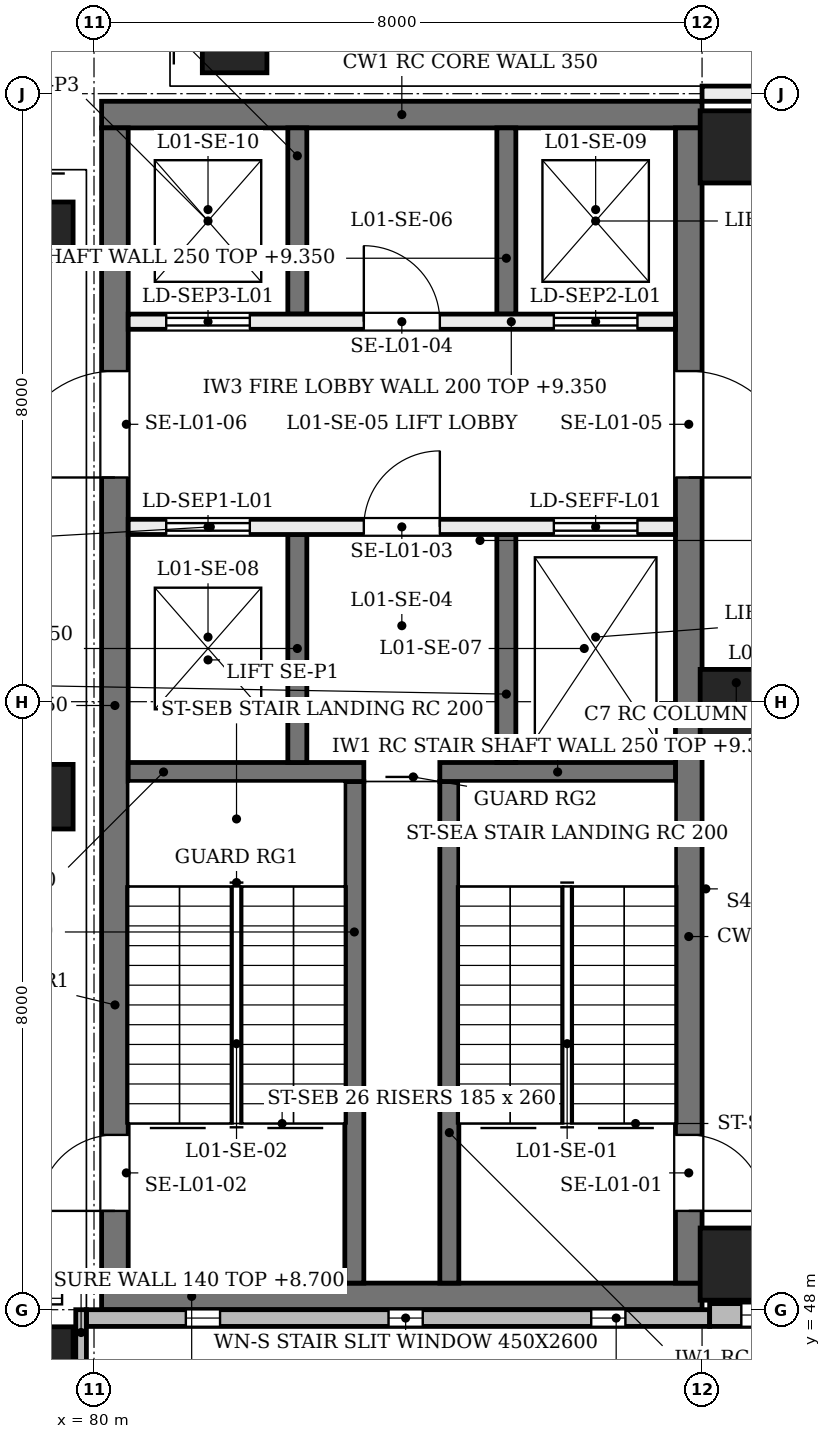
"""IFC4 building model, lengths in metres.
Left out: names, types, materials, properties, quantities, classifications, styles, units other than length and angle.
Written with IfcOpenShell. Run it as: python <this file> out.ifc"""

import sys

from ifc_helpers import new_model, si_unit, direction, frame, frame_2d, origin, origin_2d, place, context, subcontext, project, spatial, rectangle, extrude, element, fill, save


model = new_model("IFC4")
c1 = context("Model", 3, precision=1e-05, world=origin(), true_north=direction((0.0, 1.0)))
c2 = subcontext(c1, "Body", "Model", "MODEL_VIEW")
j1 = project(units=[si_unit("LENGTHUNIT", "METRE"), si_unit("PLANEANGLEUNIT", "RADIAN")], contexts=[c1])
p1 = place(None, origin())
s1 = spatial("IfcSite", under=j1, at=p1, CompositionType="ELEMENT")
p2 = place(p1, origin())
s2 = spatial("IfcBuilding", under=s1, at=p2, CompositionType="ELEMENT")
p3 = place(p2, frame((0.0, 0.0, 4.8)))
s3 = spatial("IfcBuildingStorey", under=s2, at=p3, CompositionType="ELEMENT", Elevation=4.8)
for number, where, z_axis, x_axis in (
    (1, (80.1, 48.175, 0.0), (0.0, 0.0, 1.0), (1.0, 0.0, 0.0)),
    (2, (80.1, 63.725, 0.0), (0.0, 0.0, 1.0), (1.0, 0.0, 0.0)),
):
    element("IfcWall", number, at=place(p3, frame(where, z_axis=z_axis, x_axis=x_axis)), inside=s3, PredefinedType="SHEAR", context=c2, shape_type="SweptSolid", body=[
        extrude(rectangle(XDim=7.9, YDim=0.35, at=frame_2d((3.95, 0.0))), origin(), (0.0, 0.0, 1.0), 4.58),
    ])
p4 = place(p3, frame((80.275, 48.35, 0.0), z_axis=(0.0, 0.0, 1.0), x_axis=(0.0, 1.0, 0.0)))
e3 = element("IfcWall", 3, at=p4, inside=s3, PredefinedType="SHEAR", context=c2, shape_type="SweptSolid", body=[
    extrude(rectangle(XDim=15.2, YDim=0.35, at=frame_2d((7.6, 0.0))), origin(), (0.0, 0.0, 1.0), 4.58),
])
p5 = place(p4, frame((0.95, 0.0, 0.0)))
e4 = element("IfcOpeningElement", 4, at=p5, cuts=e3, PredefinedType="OPENING", context=c2, shape_type="SweptSolid", body=[
    extrude(rectangle(XDim=1.0, YDim=2.1, at=frame_2d((0.5, 1.05))), frame((0.0, 0.185, 0.0), z_axis=(0.0, -1.0, 0.0), x_axis=(1.0, 0.0, 0.0)), (0.0, 0.0, 1.0), 0.37),
])
p6 = place(p4, frame((10.6, 0.0, 0.0)))
e5 = element("IfcOpeningElement", 5, at=p6, cuts=e3, PredefinedType="OPENING", context=c2, shape_type="SweptSolid", body=[
    extrude(rectangle(XDim=1.4, YDim=2.1, at=frame_2d((0.7, 1.05))), frame((0.0, 0.185, 0.0), z_axis=(0.0, -1.0, 0.0), x_axis=(1.0, 0.0, 0.0)), (0.0, 0.0, 1.0), 0.37),
])
p7 = place(p3, frame((87.825, 48.35, 0.0), z_axis=(0.0, 0.0, 1.0), x_axis=(0.0, 1.0, 0.0)))
e6 = element("IfcWall", 6, at=p7, inside=s3, PredefinedType="SHEAR", context=c2, shape_type="SweptSolid", body=[
    extrude(rectangle(XDim=15.2, YDim=0.35, at=frame_2d((7.6, 0.0))), origin(), (0.0, 0.0, 1.0), 4.58),
])
p8 = place(p7, frame((0.95, 0.0, 0.0)))
e7 = element("IfcOpeningElement", 7, at=p8, cuts=e6, PredefinedType="OPENING", context=c2, shape_type="SweptSolid", body=[
    extrude(rectangle(XDim=1.0, YDim=2.1, at=frame_2d((0.5, 1.05))), frame((0.0, 0.185, 0.0), z_axis=(0.0, -1.0, 0.0), x_axis=(1.0, 0.0, 0.0)), (0.0, 0.0, 1.0), 0.37),
])
p9 = place(p7, frame((10.6, 0.0, 0.0)))
e8 = element("IfcOpeningElement", 8, at=p9, cuts=e6, PredefinedType="OPENING", context=c2, shape_type="SweptSolid", body=[
    extrude(rectangle(XDim=1.4, YDim=2.1, at=frame_2d((0.7, 1.05))), frame((0.0, 0.185, 0.0), z_axis=(0.0, -1.0, 0.0), x_axis=(1.0, 0.0, 0.0)), (0.0, 0.0, 1.0), 0.37),
])
for number, where, z_axis, x_axis in (
    (9, (88.45, 48.6, 0.0), (0.0, 0.0, 1.0), (1.0, 0.0, 0.0)),
    (10, (88.45, 55.95, 0.0), (0.0, 0.0, 1.0), (1.0, 0.0, 0.0)),
    (11, (88.45, 63.3, 0.0), (0.0, 0.0, 1.0), (1.0, 0.0, 0.0)),
):
    element("IfcColumn", number, at=place(p3, frame(where, z_axis=z_axis, x_axis=x_axis)), inside=s3, PredefinedType="COLUMN", context=c2, shape_type="SweptSolid", body=[
        extrude(rectangle(XDim=0.95, YDim=0.95, at=origin_2d()), origin(), (0.0, 0.0, 1.0), 4.8),
    ])
for number, where, z_axis, x_axis in (
    (12, (79.3, 47.6, 0.0), (0.0, -0.204, 0.979), (1.0, 0.0, 0.0)),
    (13, (79.3, 55.0, 0.0), (0.0, -0.204, 0.979), (1.0, 0.0, 0.0)),
    (14, (79.3, 62.4, 0.0), (0.0, -0.204, 0.979), (1.0, 0.0, 0.0)),
    (15, (81.6, 64.7, 0.0), (0.204, 0.0, 0.979), (0.0, 1.0, 0.0)),
    (16, (89.0, 64.7, 0.0), (0.204, 0.0, 0.979), (0.0, 1.0, 0.0)),
):
    element("IfcColumn", number, at=place(p3, frame(where, z_axis=z_axis, x_axis=x_axis)), inside=s3, PredefinedType="COLUMN", context=c2, shape_type="SweptSolid", body=[
        extrude(rectangle(XDim=0.85, YDim=0.85, at=origin_2d()), origin(), (0.0, 0.0, 1.0), 4.903),
    ])
p10 = place(p3, frame((79.9, 47.89, 0.0), z_axis=(0.0, 0.0, 1.0), x_axis=(1.0, 0.0, 0.0)))
e17 = element("IfcWall", 17, at=p10, inside=s3, PredefinedType="SOLIDWALL", context=c2, shape_type="SweptSolid", body=[
    extrude(rectangle(XDim=8.2, YDim=0.22, at=frame_2d((4.1, 0.0))), origin(), (0.0, 0.0, 1.0), 3.9),
])
p11 = place(p10, frame((1.308, 0.0, 0.9)))
e18 = element("IfcOpeningElement", 18, at=p11, cuts=e17, PredefinedType="OPENING", context=c2, shape_type="SweptSolid", body=[
    extrude(rectangle(XDim=0.45, YDim=2.6, at=frame_2d((0.225, 1.3))), frame((0.0, 0.12, 0.0), z_axis=(0.0, -1.0, 0.0), x_axis=(1.0, 0.0, 0.0)), (0.0, 0.0, 1.0), 0.24),
])
p12 = place(p10, frame((3.975, 0.0, 0.9)))
e19 = element("IfcOpeningElement", 19, at=p12, cuts=e17, PredefinedType="OPENING", context=c2, shape_type="SweptSolid", body=[
    extrude(rectangle(XDim=0.45, YDim=2.6, at=frame_2d((0.225, 1.3))), frame((0.0, 0.12, 0.0), z_axis=(0.0, -1.0, 0.0), x_axis=(1.0, 0.0, 0.0)), (0.0, 0.0, 1.0), 0.24),
])
p13 = place(p10, frame((6.642, 0.0, 0.9)))
e20 = element("IfcOpeningElement", 20, at=p13, cuts=e17, PredefinedType="OPENING", context=c2, shape_type="SweptSolid", body=[
    extrude(rectangle(XDim=0.45, YDim=2.6, at=frame_2d((0.225, 1.3))), frame((0.0, 0.12, 0.0), z_axis=(0.0, -1.0, 0.0), x_axis=(1.0, 0.0, 0.0)), (0.0, 0.0, 1.0), 0.24),
])
p14 = place(p3, frame((88.1, 47.93, 0.0), z_axis=(0.0, 0.0, 1.0), x_axis=(1.0, 0.0, 0.0)))
e21 = element("IfcWall", 21, at=p14, inside=s3, PredefinedType="SOLIDWALL", context=c2, shape_type="SweptSolid", body=[
    extrude(rectangle(XDim=7.9, YDim=0.3, at=frame_2d((3.95, 0.0))), origin(), (0.0, 0.0, 1.0), 3.9),
])
p15 = place(p14, frame((0.417, 0.0, 0.75)))
e22 = element("IfcOpeningElement", 22, at=p15, cuts=e21, PredefinedType="OPENING", context=c2, shape_type="SweptSolid", body=[
    extrude(rectangle(XDim=1.8, YDim=3.1, at=frame_2d((0.9, 1.55))), frame((0.0, 0.16, 0.0), z_axis=(0.0, -1.0, 0.0), x_axis=(1.0, 0.0, 0.0)), (0.0, 0.0, 1.0), 0.32),
])
p16 = place(p14, frame((3.05, 0.0, 0.75)))
e23 = element("IfcOpeningElement", 23, at=p16, cuts=e21, PredefinedType="OPENING", context=c2, shape_type="SweptSolid", body=[
    extrude(rectangle(XDim=1.8, YDim=3.1, at=frame_2d((0.9, 1.55))), frame((0.0, 0.16, 0.0), z_axis=(0.0, -1.0, 0.0), x_axis=(1.0, 0.0, 0.0)), (0.0, 0.0, 1.0), 0.32),
])
p17 = place(p14, frame((5.683, 0.0, 0.75)))
e24 = element("IfcOpeningElement", 24, at=p17, cuts=e21, PredefinedType="OPENING", context=c2, shape_type="SweptSolid", body=[
    extrude(rectangle(XDim=1.8, YDim=3.1, at=frame_2d((0.9, 1.55))), frame((0.0, 0.16, 0.0), z_axis=(0.0, -1.0, 0.0), x_axis=(1.0, 0.0, 0.0)), (0.0, 0.0, 1.0), 0.32),
])
p18 = place(p3, frame((79.83, 47.0, 0.0), z_axis=(0.0, 0.0, 1.0), x_axis=(0.0, 1.0, 0.0)))
e25 = element("IfcWall", 25, at=p18, inside=s3, PredefinedType="SOLIDWALL", context=c2, shape_type="SweptSolid", body=[
    extrude(rectangle(XDim=1.0, YDim=0.14, at=frame_2d((0.5, 0.0))), origin(), (0.0, 0.0, 1.0), 3.9),
])
for number, where, z_axis, x_axis in (
    (26, (84.675, 48.35, 0.0), (0.0, 0.0, 1.0), (0.0, 1.0, 0.0)),
    (27, (83.425, 48.35, 0.0), (0.0, 0.0, 1.0), (0.0, 1.0, 0.0)),
):
    element("IfcWall", number, at=place(p3, frame(where, z_axis=z_axis, x_axis=x_axis)), inside=s3, PredefinedType="SOLIDWALL", context=c2, shape_type="SweptSolid", body=[
        extrude(rectangle(XDim=6.6, YDim=0.25, at=frame_2d((3.3, 0.0))), origin(), (0.0, 0.0, 1.0), 4.55),
    ])
p19 = place(p3, frame((87.65, 55.075, 0.0), z_axis=(0.0, 0.0, 1.0), x_axis=(-1.0, 0.0, 0.0)))
e28 = element("IfcWall", 28, at=p19, inside=s3, PredefinedType="SOLIDWALL", context=c2, shape_type="SweptSolid", body=[
    extrude(rectangle(XDim=3.1, YDim=0.25, at=frame_2d((1.55, 0.0))), origin(), (0.0, 0.0, 1.0), 4.55),
])
p20 = place(p3, frame((83.55, 55.075, 0.0), z_axis=(0.0, 0.0, 1.0), x_axis=(-1.0, 0.0, 0.0)))
e29 = element("IfcWall", 29, at=p20, inside=s3, PredefinedType="SOLIDWALL", context=c2, shape_type="SweptSolid", body=[
    extrude(rectangle(XDim=3.1, YDim=0.25, at=frame_2d((1.55, 0.0))), origin(), (0.0, 0.0, 1.0), 4.55),
])
p21 = place(p3, frame((85.425, 55.2, 0.0), z_axis=(0.0, 0.0, 1.0), x_axis=(0.0, 1.0, 0.0)))
e30 = element("IfcWall", 30, at=p21, inside=s3, PredefinedType="SOLIDWALL", context=c2, shape_type="SweptSolid", body=[
    extrude(rectangle(XDim=3.0, YDim=0.25, at=frame_2d((1.5, 0.0))), origin(), (0.0, 0.0, 1.0), 4.55),
])
p22 = place(p3, frame((85.425, 61.1, 0.0), z_axis=(0.0, 0.0, 1.0), x_axis=(0.0, 1.0, 0.0)))
e31 = element("IfcWall", 31, at=p22, inside=s3, PredefinedType="SOLIDWALL", context=c2, shape_type="SweptSolid", body=[
    extrude(rectangle(XDim=2.45, YDim=0.25, at=frame_2d((1.225, 0.0))), origin(), (0.0, 0.0, 1.0), 4.55),
])
p23 = place(p3, frame((82.675, 55.2, 0.0), z_axis=(0.0, 0.0, 1.0), x_axis=(0.0, 1.0, 0.0)))
e32 = element("IfcWall", 32, at=p23, inside=s3, PredefinedType="SOLIDWALL", context=c2, shape_type="SweptSolid", body=[
    extrude(rectangle(XDim=3.0, YDim=0.25, at=frame_2d((1.5, 0.0))), origin(), (0.0, 0.0, 1.0), 4.55),
])
p24 = place(p3, frame((82.675, 61.1, 0.0), z_axis=(0.0, 0.0, 1.0), x_axis=(0.0, 1.0, 0.0)))
e33 = element("IfcWall", 33, at=p24, inside=s3, PredefinedType="SOLIDWALL", context=c2, shape_type="SweptSolid", body=[
    extrude(rectangle(XDim=2.45, YDim=0.25, at=frame_2d((1.225, 0.0))), origin(), (0.0, 0.0, 1.0), 4.55),
])
p25 = place(p3, frame((87.65, 58.3, 0.0), z_axis=(0.0, 0.0, 1.0), x_axis=(-1.0, 0.0, 0.0)))
e34 = element("IfcWall", 34, at=p25, inside=s3, PredefinedType="SOLIDWALL", context=c2, shape_type="SweptSolid", body=[
    extrude(rectangle(XDim=7.2, YDim=0.2, at=frame_2d((3.6, 0.0))), origin(), (0.0, 0.0, 1.0), 4.55),
])
p26 = place(p25, frame((0.5, 0.0, 0.0)))
e35 = element("IfcOpeningElement", 35, at=p26, cuts=e34, PredefinedType="OPENING", context=c2, shape_type="SweptSolid", body=[
    extrude(rectangle(XDim=1.1, YDim=2.1, at=frame_2d((0.55, 1.05))), frame((0.0, 0.11, 0.0), z_axis=(0.0, -1.0, 0.0), x_axis=(1.0, 0.0, 0.0)), (0.0, 0.0, 1.0), 0.22),
])
p27 = place(p25, frame((5.6, 0.0, 0.0)))
e36 = element("IfcOpeningElement", 36, at=p27, cuts=e34, PredefinedType="OPENING", context=c2, shape_type="SweptSolid", body=[
    extrude(rectangle(XDim=1.1, YDim=2.1, at=frame_2d((0.55, 1.05))), frame((0.0, 0.11, 0.0), z_axis=(0.0, -1.0, 0.0), x_axis=(1.0, 0.0, 0.0)), (0.0, 0.0, 1.0), 0.22),
])
p28 = place(p25, frame((3.1, 0.0, 0.0)))
e37 = element("IfcOpeningElement", 37, at=p28, cuts=e34, PredefinedType="OPENING", context=c2, shape_type="SweptSolid", body=[
    extrude(rectangle(XDim=1.0, YDim=2.1, at=frame_2d((0.5, 1.05))), frame((0.0, 0.11, 0.0), z_axis=(0.0, -1.0, 0.0), x_axis=(1.0, 0.0, 0.0)), (0.0, 0.0, 1.0), 0.22),
])
p29 = place(p3, frame((87.65, 61.0, 0.0), z_axis=(0.0, 0.0, 1.0), x_axis=(-1.0, 0.0, 0.0)))
e38 = element("IfcWall", 38, at=p29, inside=s3, PredefinedType="SOLIDWALL", context=c2, shape_type="SweptSolid", body=[
    extrude(rectangle(XDim=7.2, YDim=0.2, at=frame_2d((3.6, 0.0))), origin(), (0.0, 0.0, 1.0), 4.55),
])
p30 = place(p29, frame((0.5, 0.0, 0.0)))
e39 = element("IfcOpeningElement", 39, at=p30, cuts=e38, PredefinedType="OPENING", context=c2, shape_type="SweptSolid", body=[
    extrude(rectangle(XDim=1.1, YDim=2.1, at=frame_2d((0.55, 1.05))), frame((0.0, 0.11, 0.0), z_axis=(0.0, -1.0, 0.0), x_axis=(1.0, 0.0, 0.0)), (0.0, 0.0, 1.0), 0.22),
])
p31 = place(p29, frame((5.6, 0.0, 0.0)))
e40 = element("IfcOpeningElement", 40, at=p31, cuts=e38, PredefinedType="OPENING", context=c2, shape_type="SweptSolid", body=[
    extrude(rectangle(XDim=1.1, YDim=2.1, at=frame_2d((0.55, 1.05))), frame((0.0, 0.11, 0.0), z_axis=(0.0, -1.0, 0.0), x_axis=(1.0, 0.0, 0.0)), (0.0, 0.0, 1.0), 0.22),
])
p32 = place(p29, frame((3.1, 0.0, 0.0)))
e41 = element("IfcOpeningElement", 41, at=p32, cuts=e38, PredefinedType="OPENING", context=c2, shape_type="SweptSolid", body=[
    extrude(rectangle(XDim=1.0, YDim=2.1, at=frame_2d((0.5, 1.05))), frame((0.0, 0.11, 0.0), z_axis=(0.0, -1.0, 0.0), x_axis=(1.0, 0.0, 0.0)), (0.0, 0.0, 1.0), 0.22),
])
p33 = place(p3, frame((88.0, 64.0, 0.0), z_axis=(0.0, 0.0, 1.0), x_axis=(1.0, 0.0, 0.0)))
e42 = element("IfcWall", 42, at=p33, inside=s3, PredefinedType="PARTITIONING", context=c2, shape_type="SweptSolid", body=[
    extrude(rectangle(XDim=3.6, YDim=0.2, at=frame_2d((1.8, 0.0))), origin(), (0.0, 0.0, 1.0), 3.88),
])
p34 = place(p33, frame((2.55, 0.0, 0.0)))
e43 = element("IfcOpeningElement", 43, at=p34, cuts=e42, PredefinedType="OPENING", context=c2, shape_type="SweptSolid", body=[
    extrude(rectangle(XDim=1.0, YDim=2.1, at=frame_2d((0.5, 1.05))), frame((0.0, 0.11, 0.0), z_axis=(0.0, -1.0, 0.0), x_axis=(1.0, 0.0, 0.0)), (0.0, 0.0, 1.0), 0.22),
])
p35 = place(p11, origin())
e44 = element("IfcWindow", 44, at=p35, inside=s3, PartitioningType="SINGLE_PANEL", PredefinedType="WINDOW", context=c2, shape_type="SweptSolid", body=[
    extrude(rectangle(XDim=0.45, YDim=2.6, at=frame_2d((0.225, 1.3))), frame((0.0, 0.03, 0.0), z_axis=(0.0, -1.0, 0.0), x_axis=(1.0, 0.0, 0.0)), (0.0, 0.0, 1.0), 0.06),
])
fill(e18, e44)
p36 = place(p12, origin())
e45 = element("IfcWindow", 45, at=p36, inside=s3, PartitioningType="SINGLE_PANEL", PredefinedType="WINDOW", context=c2, shape_type="SweptSolid", body=[
    extrude(rectangle(XDim=0.45, YDim=2.6, at=frame_2d((0.225, 1.3))), frame((0.0, 0.03, 0.0), z_axis=(0.0, -1.0, 0.0), x_axis=(1.0, 0.0, 0.0)), (0.0, 0.0, 1.0), 0.06),
])
fill(e19, e45)
p37 = place(p13, origin())
e46 = element("IfcWindow", 46, at=p37, inside=s3, PartitioningType="SINGLE_PANEL", PredefinedType="WINDOW", context=c2, shape_type="SweptSolid", body=[
    extrude(rectangle(XDim=0.45, YDim=2.6, at=frame_2d((0.225, 1.3))), frame((0.0, 0.03, 0.0), z_axis=(0.0, -1.0, 0.0), x_axis=(1.0, 0.0, 0.0)), (0.0, 0.0, 1.0), 0.06),
])
fill(e20, e46)
p38 = place(p15, origin())
e47 = element("IfcWindow", 47, at=p38, inside=s3, PartitioningType="SINGLE_PANEL", PredefinedType="WINDOW", context=c2, shape_type="SweptSolid", body=[
    extrude(rectangle(XDim=1.8, YDim=3.1, at=frame_2d((0.9, 1.55))), frame((0.0, 0.03, 0.0), z_axis=(0.0, -1.0, 0.0), x_axis=(1.0, 0.0, 0.0)), (0.0, 0.0, 1.0), 0.06),
])
fill(e22, e47)
p39 = place(p8, frame((1.0, 0.0, 0.0), z_axis=(0.0, 0.0, 1.0), x_axis=(-1.0, 0.0, 0.0)))
e48 = element("IfcDoor", 48, at=p39, inside=s3, OperationType="SINGLE_SWING_LEFT", PredefinedType="DOOR", context=c2, shape_type="SweptSolid", body=[
    extrude(rectangle(XDim=1.0, YDim=2.1, at=frame_2d((0.5, 1.05))), frame((0.0, 0.025, 0.0), z_axis=(0.0, -1.0, 0.0), x_axis=(1.0, 0.0, 0.0)), (0.0, 0.0, 1.0), 0.05),
])
fill(e7, e48)
p40 = place(p5, origin())
e49 = element("IfcDoor", 49, at=p40, inside=s3, OperationType="SINGLE_SWING_LEFT", PredefinedType="DOOR", context=c2, shape_type="SweptSolid", body=[
    extrude(rectangle(XDim=1.0, YDim=2.1, at=frame_2d((0.5, 1.05))), frame((0.0, 0.025, 0.0), z_axis=(0.0, -1.0, 0.0), x_axis=(1.0, 0.0, 0.0)), (0.0, 0.0, 1.0), 0.05),
])
fill(e4, e49)
p41 = place(p26, frame((1.1, 0.0, 0.0), z_axis=(0.0, 0.0, 1.0), x_axis=(-1.0, 0.0, 0.0)))
e50 = element("IfcDoor", 50, at=p41, inside=s3, OperationType="DOUBLE_DOOR_SLIDING", PredefinedType="DOOR", context=c2, shape_type="SweptSolid", body=[
    extrude(rectangle(XDim=1.1, YDim=2.1, at=frame_2d((0.55, 1.05))), frame((0.0, 0.025, 0.0), z_axis=(0.0, -1.0, 0.0), x_axis=(1.0, 0.0, 0.0)), (0.0, 0.0, 1.0), 0.05),
])
fill(e35, e50)
p42 = place(p27, frame((1.1, 0.0, 0.0), z_axis=(0.0, 0.0, 1.0), x_axis=(-1.0, 0.0, 0.0)))
e51 = element("IfcDoor", 51, at=p42, inside=s3, OperationType="DOUBLE_DOOR_SLIDING", PredefinedType="DOOR", context=c2, shape_type="SweptSolid", body=[
    extrude(rectangle(XDim=1.1, YDim=2.1, at=frame_2d((0.55, 1.05))), frame((0.0, 0.025, 0.0), z_axis=(0.0, -1.0, 0.0), x_axis=(1.0, 0.0, 0.0)), (0.0, 0.0, 1.0), 0.05),
])
fill(e36, e51)
p43 = place(p30, origin())
e52 = element("IfcDoor", 52, at=p43, inside=s3, OperationType="DOUBLE_DOOR_SLIDING", PredefinedType="DOOR", context=c2, shape_type="SweptSolid", body=[
    extrude(rectangle(XDim=1.1, YDim=2.1, at=frame_2d((0.55, 1.05))), frame((0.0, 0.025, 0.0), z_axis=(0.0, -1.0, 0.0), x_axis=(1.0, 0.0, 0.0)), (0.0, 0.0, 1.0), 0.05),
])
fill(e39, e52)
p44 = place(p31, origin())
e53 = element("IfcDoor", 53, at=p44, inside=s3, OperationType="DOUBLE_DOOR_SLIDING", PredefinedType="DOOR", context=c2, shape_type="SweptSolid", body=[
    extrude(rectangle(XDim=1.1, YDim=2.1, at=frame_2d((0.55, 1.05))), frame((0.0, 0.025, 0.0), z_axis=(0.0, -1.0, 0.0), x_axis=(1.0, 0.0, 0.0)), (0.0, 0.0, 1.0), 0.05),
])
fill(e40, e53)
p45 = place(p28, frame((1.0, 0.0, 0.0), z_axis=(0.0, 0.0, 1.0), x_axis=(-1.0, 0.0, 0.0)))
e54 = element("IfcDoor", 54, at=p45, inside=s3, OperationType="SINGLE_SWING_LEFT", PredefinedType="DOOR", context=c2, shape_type="SweptSolid", body=[
    extrude(rectangle(XDim=1.0, YDim=2.1, at=frame_2d((0.5, 1.05))), frame((0.0, 0.025, 0.0), z_axis=(0.0, -1.0, 0.0), x_axis=(1.0, 0.0, 0.0)), (0.0, 0.0, 1.0), 0.05),
])
fill(e37, e54)
p46 = place(p32, origin())
e55 = element("IfcDoor", 55, at=p46, inside=s3, OperationType="SINGLE_SWING_RIGHT", PredefinedType="DOOR", context=c2, shape_type="SweptSolid", body=[
    extrude(rectangle(XDim=1.0, YDim=2.1, at=frame_2d((0.5, 1.05))), frame((0.0, 0.025, 0.0), z_axis=(0.0, -1.0, 0.0), x_axis=(1.0, 0.0, 0.0)), (0.0, 0.0, 1.0), 0.05),
])
fill(e41, e55)
p47 = place(p9, frame((1.4, 0.0, 0.0), z_axis=(0.0, 0.0, 1.0), x_axis=(-1.0, 0.0, 0.0)))
e56 = element("IfcDoor", 56, at=p47, inside=s3, OperationType="SINGLE_SWING_LEFT", PredefinedType="DOOR", context=c2, shape_type="SweptSolid", body=[
    extrude(rectangle(XDim=1.4, YDim=2.1, at=frame_2d((0.7, 1.05))), frame((0.0, 0.025, 0.0), z_axis=(0.0, -1.0, 0.0), x_axis=(1.0, 0.0, 0.0)), (0.0, 0.0, 1.0), 0.05),
])
fill(e8, e56)
p48 = place(p6, origin())
e57 = element("IfcDoor", 57, at=p48, inside=s3, OperationType="SINGLE_SWING_LEFT", PredefinedType="DOOR", context=c2, shape_type="SweptSolid", body=[
    extrude(rectangle(XDim=1.4, YDim=2.1, at=frame_2d((0.7, 1.05))), frame((0.0, 0.025, 0.0), z_axis=(0.0, -1.0, 0.0), x_axis=(1.0, 0.0, 0.0)), (0.0, 0.0, 1.0), 0.05),
])
fill(e5, e57)
save(model, sys.argv[1])
